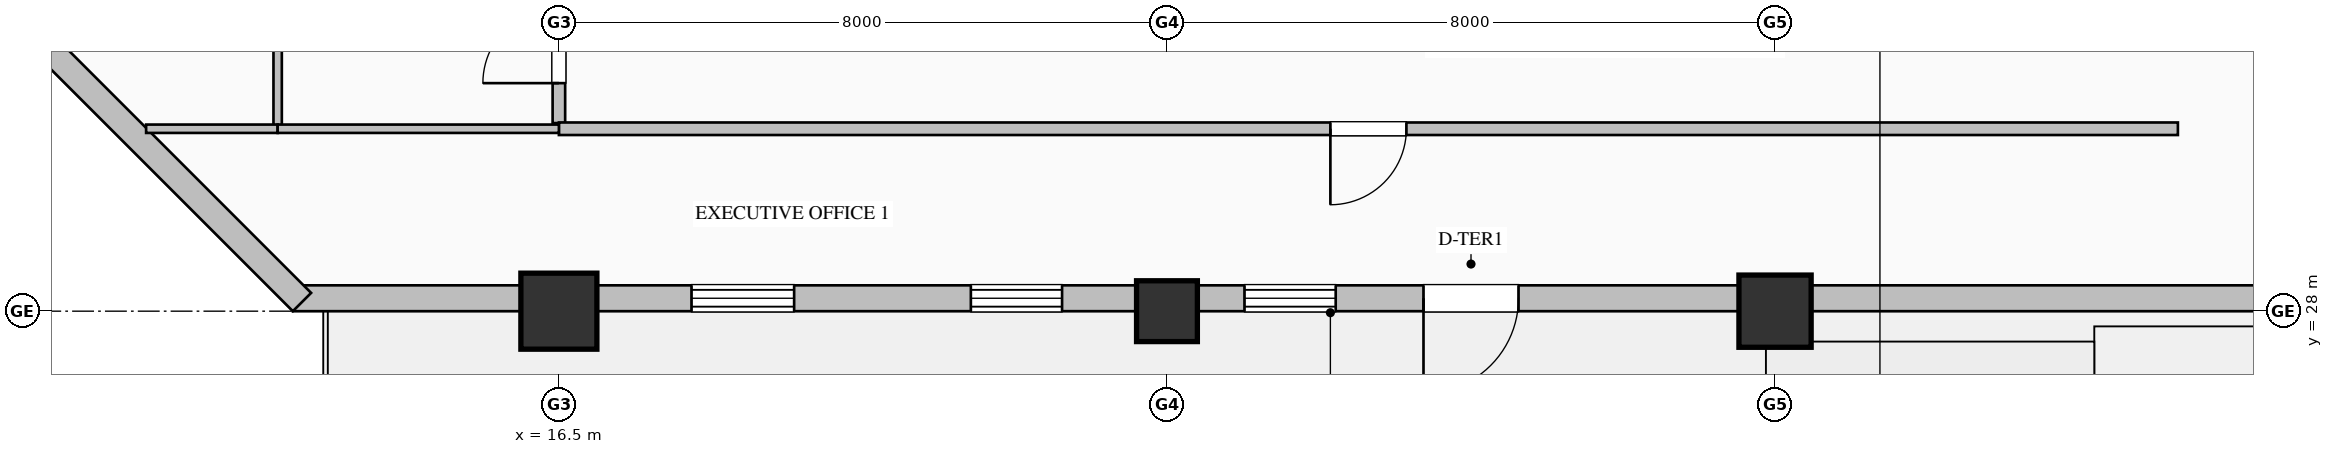
"""IFC4 building model, lengths in metres.
Left out: names, types, materials, properties, quantities, classifications, styles, units other than length and angle.
Written with IfcOpenShell. Run it as: python <this file> out.ifc"""

import sys

from ifc_helpers import new_model, si_unit, direction, frame, frame_2d, origin, origin_2d, place, context, subcontext, project, spatial, rectangle, hollow_rectangle, hollow_circle, extrude, element, fill, save


model = new_model("IFC4")
c1 = context("Model", 3, precision=1e-05, world=origin(), true_north=direction((0.0, 1.0)))
c2 = subcontext(c1, "Body", "Model", "MODEL_VIEW")
j1 = project(units=[si_unit("LENGTHUNIT", "METRE"), si_unit("PLANEANGLEUNIT", "RADIAN")], contexts=[c1])
p1 = place(None, origin())
s1 = spatial("IfcSite", under=j1, at=p1, CompositionType="ELEMENT")
p2 = place(p1, origin())
s2 = spatial("IfcBuilding", under=s1, at=p2, CompositionType="ELEMENT")
p3 = place(p2, frame((0.0, 0.0, 205.8)))
s3 = spatial("IfcBuildingStorey", under=s2, at=p3, CompositionType="ELEMENT", Elevation=205.8)
p4 = place(p3, frame((16.5, 28.0, 0.0), z_axis=(0.0, 0.0, 1.0), x_axis=(1.0, 0.0, 0.0)))
e1 = element("IfcColumn", 1, at=p4, inside=s3, PredefinedType="COLUMN", context=c2, shape_type="SweptSolid", body=[
    extrude(hollow_circle(Radius=0.5, WallThickness=0.036, at=origin_2d()), origin(), (0.0, 0.0, 1.0), 4.0),
])
p5 = place(p3, frame((24.5, 28.0, 0.0), z_axis=(0.0, 0.0, 1.0), x_axis=(1.0, 0.0, 0.0)))
e2 = element("IfcColumn", 2, at=p5, inside=s3, PredefinedType="COLUMN", context=c2, shape_type="SweptSolid", body=[
    extrude(hollow_rectangle(XDim=0.8, YDim=0.8, WallThickness=0.032, at=origin_2d()), origin(), (0.0, 0.0, 1.0), 4.0),
])
p6 = place(p3, frame((32.5, 28.0, 0.0), z_axis=(0.0, 0.0, 1.0), x_axis=(1.0, 0.0, 0.0)))
e3 = element("IfcColumn", 3, at=p6, inside=s3, PredefinedType="COLUMN", context=c2, shape_type="SweptSolid", body=[
    extrude(hollow_rectangle(XDim=0.95, YDim=0.95, WallThickness=0.036, at=origin_2d()), origin(), (0.0, 0.0, 1.0), 4.0),
])
p7 = place(p3, frame((40.52, 28.17, 0.0), z_axis=(0.0, 0.0, 1.0), x_axis=(-1.0, 0.0, 0.0)))
e4 = element("IfcWall", 4, at=p7, inside=s3, PredefinedType="SOLIDWALL", context=c2, shape_type="SweptSolid", body=[
    extrude(rectangle(XDim=27.52, YDim=0.34, at=frame_2d((13.76, 0.0))), origin(), (0.0, 0.0, 1.0), 3.187),
])
p8 = place(p7, frame((13.8, 0.0, 0.7)))
e5 = element("IfcOpeningElement", 5, at=p8, cuts=e4, PredefinedType="OPENING", context=c2, shape_type="SweptSolid", body=[
    extrude(rectangle(XDim=1.2, YDim=1.85, at=frame_2d((0.6, 0.925))), frame((0.0, 0.18, 0.0), z_axis=(0.0, -1.0, 0.0), x_axis=(1.0, 0.0, 0.0)), (0.0, 0.0, 1.0), 0.36),
])
p9 = place(p7, frame((17.4, 0.0, 0.9)))
e6 = element("IfcOpeningElement", 6, at=p9, cuts=e4, PredefinedType="OPENING", context=c2, shape_type="SweptSolid", body=[
    extrude(rectangle(XDim=1.2, YDim=1.85, at=frame_2d((0.6, 0.925))), frame((0.0, 0.18, 0.0), z_axis=(0.0, -1.0, 0.0), x_axis=(1.0, 0.0, 0.0)), (0.0, 0.0, 1.0), 0.36),
])
p10 = place(p7, frame((20.925, 0.0, 0.9)))
e7 = element("IfcOpeningElement", 7, at=p10, cuts=e4, PredefinedType="OPENING", context=c2, shape_type="SweptSolid", body=[
    extrude(rectangle(XDim=1.35, YDim=1.85, at=frame_2d((0.675, 0.925))), frame((0.0, 0.18, 0.0), z_axis=(0.0, -1.0, 0.0), x_axis=(1.0, 0.0, 0.0)), (0.0, 0.0, 1.0), 0.36),
])
p11 = place(p7, frame((11.395, 0.0, 0.0)))
e8 = element("IfcOpeningElement", 8, at=p11, cuts=e4, PredefinedType="OPENING", context=c2, shape_type="SweptSolid", body=[
    extrude(rectangle(XDim=1.25, YDim=2.25, at=frame_2d((0.625, 1.125))), frame((0.0, 0.18, 0.0), z_axis=(0.0, -1.0, 0.0), x_axis=(1.0, 0.0, 0.0)), (0.0, 0.0, 1.0), 0.36),
])
p12 = place(p3, frame((13.12, 28.12, 0.0), z_axis=(0.0, 0.0, 1.0), x_axis=(-0.707106781187, 0.707106781187, 0.0)))
e9 = element("IfcWall", 9, at=p12, inside=s3, PredefinedType="SOLIDWALL", context=c2, shape_type="SweptSolid", body=[
    extrude(rectangle(XDim=5.657, YDim=0.34, at=frame_2d((2.828, 0.0))), origin(), (0.0, 0.0, 1.0), 3.775),
])
p13 = place(p3, frame((16.5, 30.475, 0.0), z_axis=(0.0, 0.0, 1.0), x_axis=(0.0, 1.0, 0.0)))
e10 = element("IfcWall", 10, at=p13, inside=s3, PredefinedType="PARTITIONING", context=c2, shape_type="SweptSolid", body=[
    extrude(rectangle(XDim=2.051, YDim=0.165, at=frame_2d((1.025, 0.0))), origin(), (0.0, 0.0, 1.0), 3.179),
])
p14 = place(p13, frame((0.525, 0.0, 0.0)))
e11 = element("IfcOpeningElement", 11, at=p14, cuts=e10, PredefinedType="OPENING", context=c2, shape_type="SweptSolid", body=[
    extrude(rectangle(XDim=1.0, YDim=2.15, at=frame_2d((0.5, 1.075))), frame((0.0, 0.093, 0.0), z_axis=(0.0, -1.0, 0.0), x_axis=(1.0, 0.0, 0.0)), (0.0, 0.0, 1.0), 0.185),
])
p15 = place(p3, frame((37.8, 30.4, 0.0), z_axis=(0.0, 0.0, 1.0), x_axis=(-1.0, 0.0, 0.0)))
e12 = element("IfcWall", 12, at=p15, inside=s3, PredefinedType="PARTITIONING", context=c2, shape_type="SweptSolid", body=[
    extrude(rectangle(XDim=21.3, YDim=0.165, at=frame_2d((10.65, 0.0))), origin(), (0.0, 0.0, 1.0), 3.775),
])
p16 = place(p15, frame((10.15, 0.0, 0.0)))
e13 = element("IfcOpeningElement", 13, at=p16, cuts=e12, PredefinedType="OPENING", context=c2, shape_type="SweptSolid", body=[
    extrude(rectangle(XDim=1.0, YDim=2.15, at=frame_2d((0.5, 1.075))), frame((0.0, 0.093, 0.0), z_axis=(0.0, -1.0, 0.0), x_axis=(1.0, 0.0, 0.0)), (0.0, 0.0, 1.0), 0.185),
])
p17 = place(p3, frame((12.8, 51.331, 0.0), z_axis=(0.0, 0.0, 1.0), x_axis=(0.0, -1.0, 0.0)))
e14 = element("IfcWall", 14, at=p17, inside=s3, PredefinedType="MOVABLE", context=c2, shape_type="SweptSolid", body=[
    extrude(rectangle(XDim=20.884, YDim=0.11, at=frame_2d((10.442, 0.0))), origin(), (0.0, 0.0, 1.0), 3.775),
])
p18 = place(p17, frame((9.942, 0.0, 0.0)))
e15 = element("IfcOpeningElement", 15, at=p18, cuts=e14, PredefinedType="OPENING", context=c2, shape_type="SweptSolid", body=[
    extrude(rectangle(XDim=1.0, YDim=2.15, at=frame_2d((0.5, 1.075))), frame((0.0, 0.065, 0.0), z_axis=(0.0, -1.0, 0.0), x_axis=(1.0, 0.0, 0.0)), (0.0, 0.0, 1.0), 0.13),
])
p19 = place(p3, frame((12.8, 30.4, 0.0), z_axis=(0.0, 0.0, 1.0), x_axis=(-1.0, 0.0, 0.0)))
e16 = element("IfcWall", 16, at=p19, inside=s3, PredefinedType="MOVABLE", context=c2, shape_type="SweptSolid", body=[
    extrude(rectangle(XDim=1.73, YDim=0.11, at=frame_2d((0.865, 0.0))), origin(), (0.0, 0.0, 1.0), 3.775),
])
p20 = place(p3, frame((16.5, 30.4, 0.0), z_axis=(0.0, 0.0, 1.0), x_axis=(-1.0, 0.0, 0.0)))
e17 = element("IfcWall", 17, at=p20, inside=s3, PredefinedType="MOVABLE", context=c2, shape_type="SweptSolid", body=[
    extrude(rectangle(XDim=3.7, YDim=0.11, at=frame_2d((1.85, 0.0))), origin(), (0.0, 0.0, 1.0), 3.775),
])
p21 = place(p8, origin())
e18 = element("IfcWindow", 18, at=p21, inside=s3, PartitioningType="DOUBLE_PANEL_VERTICAL", PredefinedType="WINDOW", context=c2, shape_type="SweptSolid", body=[
    extrude(rectangle(XDim=1.2, YDim=1.85, at=frame_2d((0.6, 0.925))), frame((0.0, 0.15, 0.0), z_axis=(0.0, -1.0, 0.0), x_axis=(1.0, 0.0, 0.0)), (0.0, 0.0, 1.0), 0.06),
])
fill(e5, e18)
p22 = place(p9, origin())
e19 = element("IfcWindow", 19, at=p22, inside=s3, PartitioningType="DOUBLE_PANEL_VERTICAL", PredefinedType="WINDOW", context=c2, shape_type="SweptSolid", body=[
    extrude(rectangle(XDim=1.2, YDim=1.85, at=frame_2d((0.6, 0.925))), frame((0.0, 0.15, 0.0), z_axis=(0.0, -1.0, 0.0), x_axis=(1.0, 0.0, 0.0)), (0.0, 0.0, 1.0), 0.06),
])
fill(e6, e19)
p23 = place(p10, origin())
e20 = element("IfcWindow", 20, at=p23, inside=s3, PartitioningType="DOUBLE_PANEL_VERTICAL", PredefinedType="WINDOW", context=c2, shape_type="SweptSolid", body=[
    extrude(rectangle(XDim=1.35, YDim=1.85, at=frame_2d((0.675, 0.925))), frame((0.0, 0.15, 0.0), z_axis=(0.0, -1.0, 0.0), x_axis=(1.0, 0.0, 0.0)), (0.0, 0.0, 1.0), 0.06),
])
fill(e7, e20)
p24 = place(p11, origin())
e21 = element("IfcDoor", 21, at=p24, inside=s3, OperationType="SINGLE_SWING_RIGHT", PredefinedType="DOOR", context=c2, shape_type="SweptSolid", body=[
    extrude(rectangle(XDim=1.25, YDim=2.25, at=frame_2d((0.625, 1.125))), frame((0.0, 0.025, 0.0), z_axis=(0.0, -1.0, 0.0), x_axis=(1.0, 0.0, 0.0)), (0.0, 0.0, 1.0), 0.05),
])
fill(e8, e21)
p25 = place(p14, origin())
e22 = element("IfcDoor", 22, at=p25, inside=s3, OperationType="SINGLE_SWING_LEFT", PredefinedType="DOOR", context=c2, shape_type="SweptSolid", body=[
    extrude(rectangle(XDim=1.0, YDim=2.15, at=frame_2d((0.5, 1.075))), frame((0.0, 0.025, 0.0), z_axis=(0.0, -1.0, 0.0), x_axis=(1.0, 0.0, 0.0)), (0.0, 0.0, 1.0), 0.05),
])
fill(e11, e22)
p26 = place(p16, origin())
e23 = element("IfcDoor", 23, at=p26, inside=s3, OperationType="SINGLE_SWING_RIGHT", PredefinedType="DOOR", context=c2, shape_type="SweptSolid", body=[
    extrude(rectangle(XDim=1.0, YDim=2.15, at=frame_2d((0.5, 1.075))), frame((0.0, 0.025, 0.0), z_axis=(0.0, -1.0, 0.0), x_axis=(1.0, 0.0, 0.0)), (0.0, 0.0, 1.0), 0.05),
])
fill(e13, e23)
save(model, sys.argv[1])
